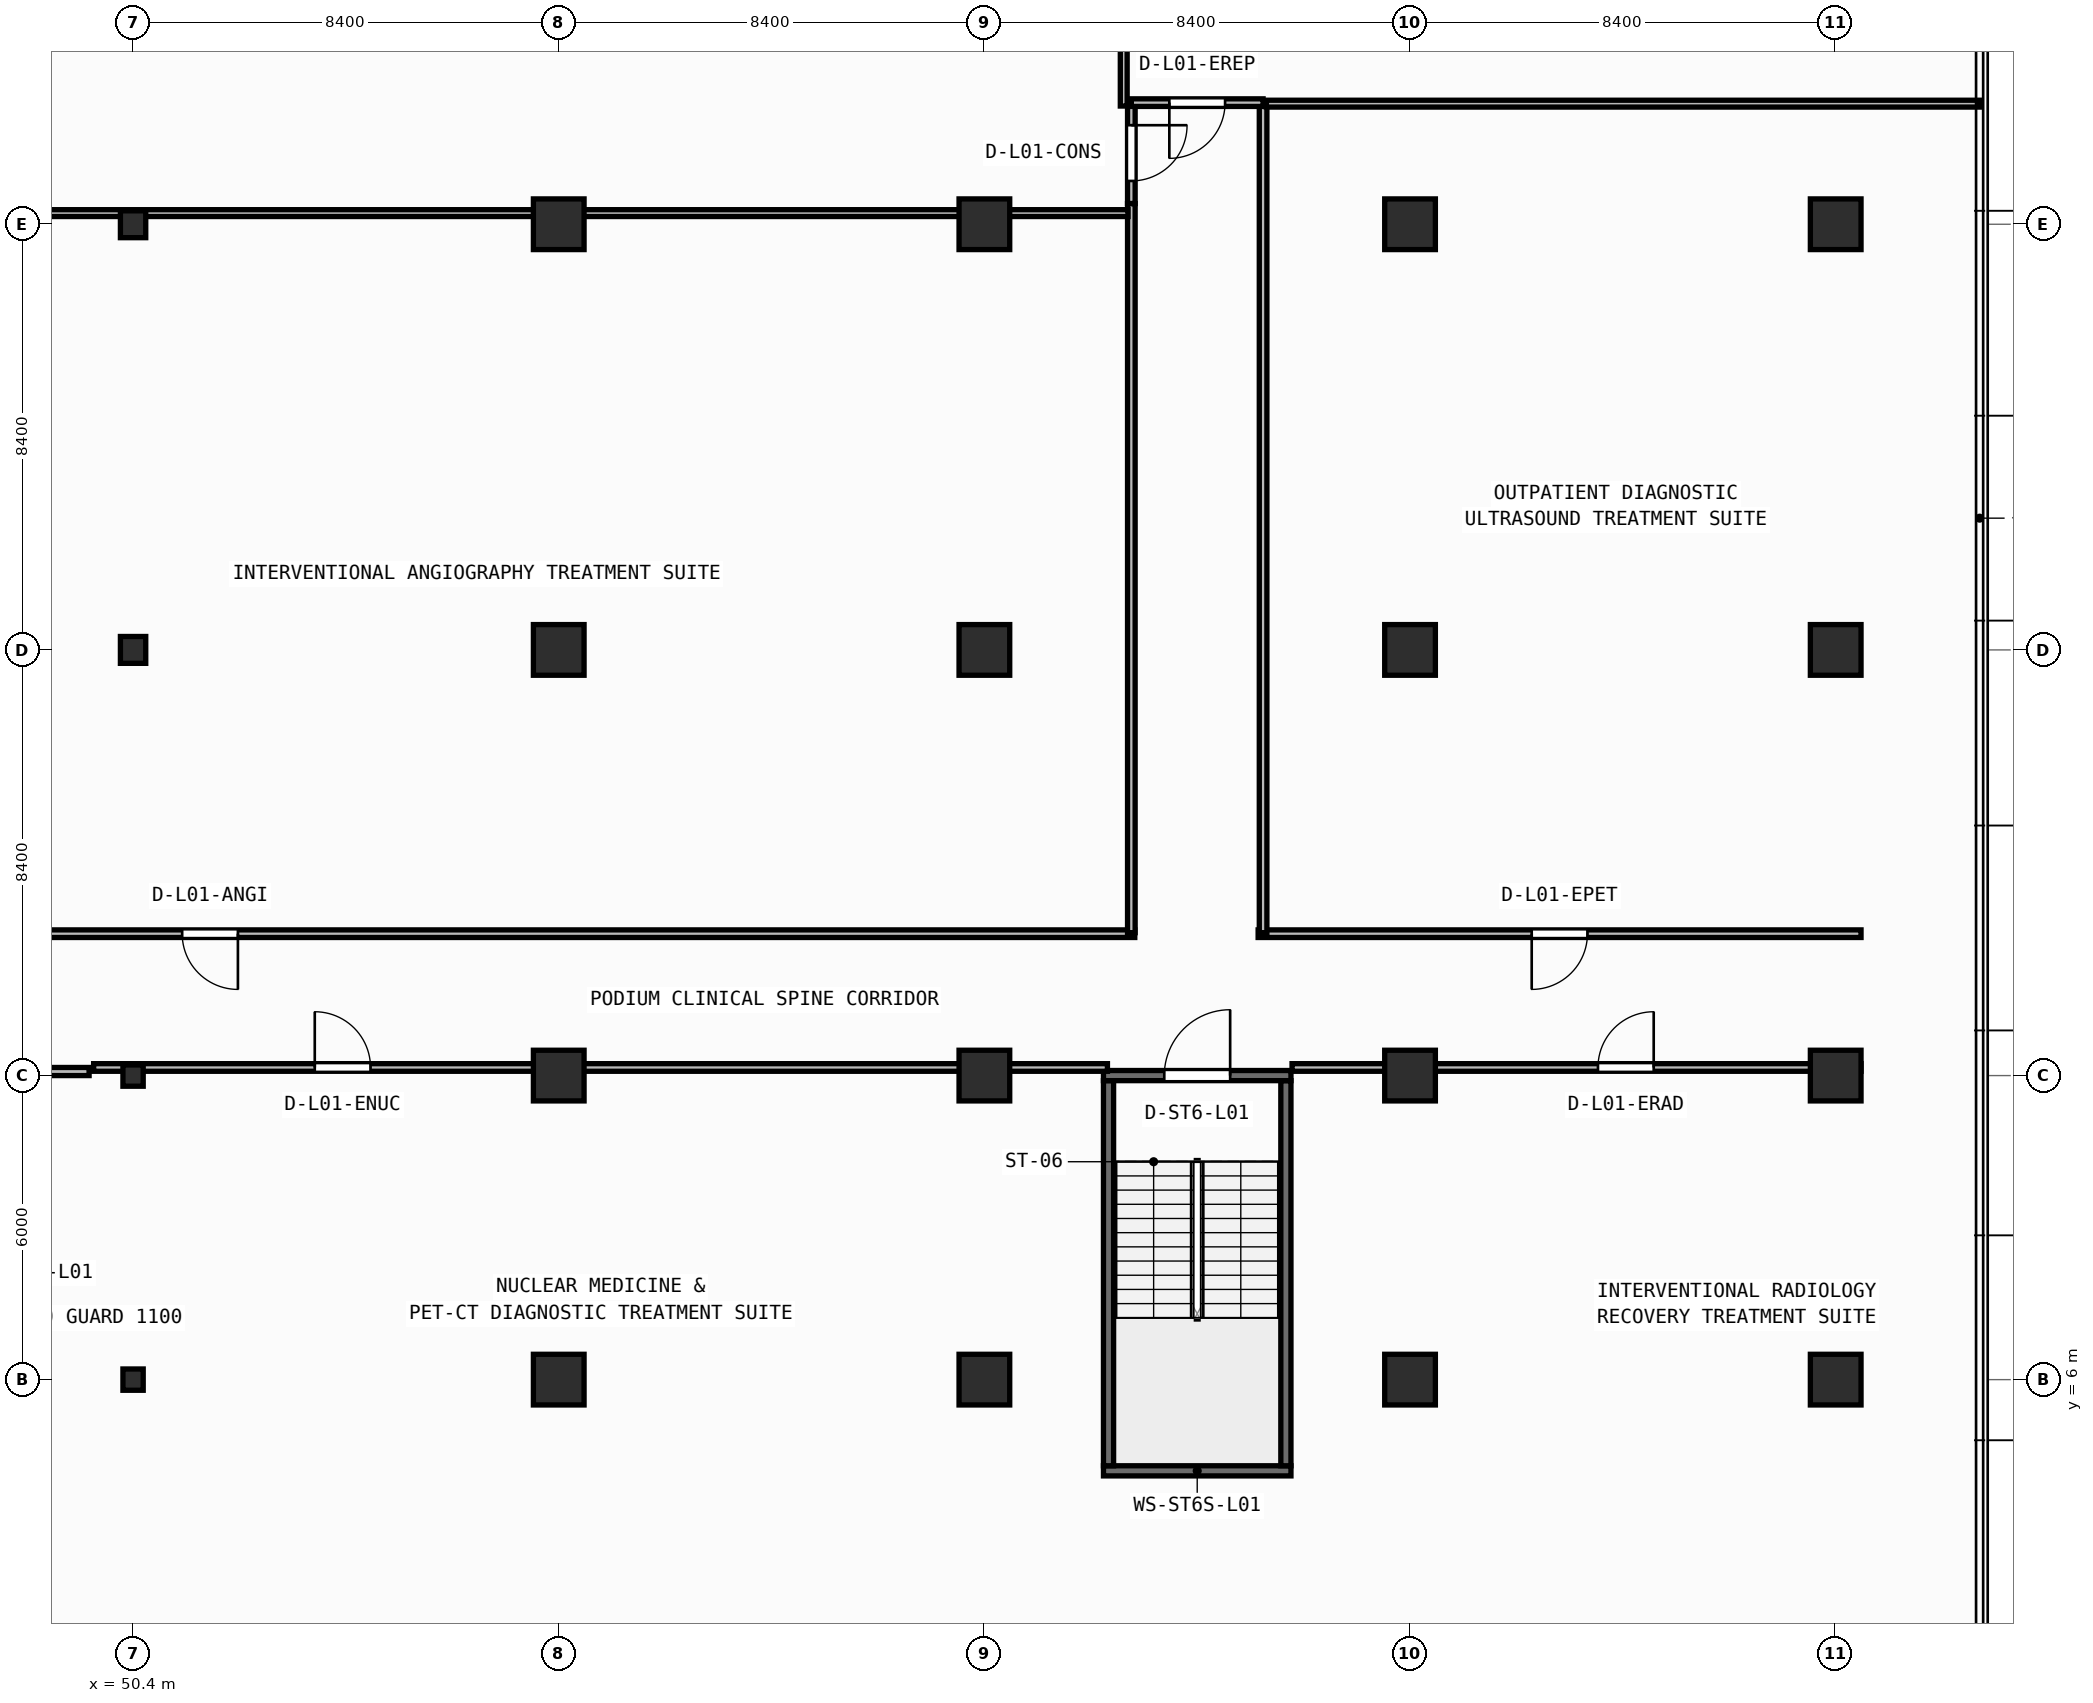
"""IFC4 building model, lengths in metres.
Left out: names, types, materials, properties, quantities, classifications, styles, units other than length and angle.
Written with IfcOpenShell. Run it as: python <this file> out.ifc"""

import sys

from ifc_helpers import new_model, si_unit, direction, frame, frame_2d, origin, origin_2d, place, context, subcontext, project, spatial, rectangle, circle, i_section, extrude, element, fill, save


model = new_model("IFC4")
c1 = context("Model", 3, precision=1e-05, world=origin(), true_north=direction((0.0, 1.0)))
c2 = subcontext(c1, "Body", "Model", "MODEL_VIEW")
j1 = project(units=[si_unit("LENGTHUNIT", "METRE"), si_unit("PLANEANGLEUNIT", "RADIAN")], contexts=[c1])
p1 = place(None, origin())
s1 = spatial("IfcSite", under=j1, at=p1, CompositionType="ELEMENT")
p2 = place(p1, origin())
s2 = spatial("IfcBuilding", under=s1, at=p2, CompositionType="ELEMENT")
p3 = place(p2, frame((0.0, 0.0, 4.5)))
s3 = spatial("IfcBuildingStorey", under=s2, at=p3, CompositionType="ELEMENT", Elevation=4.5)
p4 = place(p3, frame((50.4, 6.0, 0.0), z_axis=(0.0, 0.0, 1.0), x_axis=(1.0, 0.0, 0.0)))
e1 = element("IfcColumn", 1, at=p4, inside=s3, PredefinedType="COLUMN", context=c2, shape_type="SweptSolid", body=[
    extrude(i_section(OverallWidth=0.4, OverallDepth=0.42, WebThickness=0.025, FlangeThickness=0.04, at=origin_2d()), origin(), (0.0, 0.0, 1.0), 4.5),
])
for number, where, z_axis, x_axis in (
    (2, (58.8, 6.0, 0.0), (0.0, 0.0, 1.0), (1.0, 0.0, 0.0)),
    (3, (67.2, 6.0, 0.0), (0.0, 0.0, 1.0), (1.0, 0.0, 0.0)),
    (4, (75.6, 6.0, 0.0), (0.0, 0.0, 1.0), (1.0, 0.0, 0.0)),
    (5, (84.0, 6.0, 0.0), (0.0, 0.0, 1.0), (1.0, 0.0, 0.0)),
):
    element("IfcColumn", number, at=place(p3, frame(where, z_axis=z_axis, x_axis=x_axis)), inside=s3, PredefinedType="COLUMN", context=c2, shape_type="SweptSolid", body=[
        extrude(circle(Radius=0.5, at=origin_2d()), origin(), (0.0, 0.0, 1.0), 4.5),
    ])
p5 = place(p3, frame((50.4, 12.0, 0.0), z_axis=(0.0, 0.0, 1.0), x_axis=(1.0, 0.0, 0.0)))
e6 = element("IfcColumn", 6, at=p5, inside=s3, PredefinedType="COLUMN", context=c2, shape_type="SweptSolid", body=[
    extrude(i_section(OverallWidth=0.4, OverallDepth=0.42, WebThickness=0.025, FlangeThickness=0.04, at=origin_2d()), origin(), (0.0, 0.0, 1.0), 4.5),
])
for number, where, z_axis, x_axis in (
    (7, (58.8, 12.0, 0.0), (0.0, 0.0, 1.0), (1.0, 0.0, 0.0)),
    (8, (67.2, 12.0, 0.0), (0.0, 0.0, 1.0), (1.0, 0.0, 0.0)),
    (9, (75.6, 12.0, 0.0), (0.0, 0.0, 1.0), (1.0, 0.0, 0.0)),
    (10, (84.0, 12.0, 0.0), (0.0, 0.0, 1.0), (1.0, 0.0, 0.0)),
):
    element("IfcColumn", number, at=place(p3, frame(where, z_axis=z_axis, x_axis=x_axis)), inside=s3, PredefinedType="COLUMN", context=c2, shape_type="SweptSolid", body=[
        extrude(circle(Radius=0.5, at=origin_2d()), origin(), (0.0, 0.0, 1.0), 4.5),
    ])
p6 = place(p3, frame((50.4, 20.4, 0.0), z_axis=(0.0, 0.0, 1.0), x_axis=(1.0, 0.0, 0.0)))
e11 = element("IfcColumn", 11, at=p6, inside=s3, PredefinedType="COLUMN", context=c2, shape_type="SweptSolid", body=[
    extrude(i_section(OverallWidth=0.5, OverallDepth=0.53, WebThickness=0.028, FlangeThickness=0.045, at=origin_2d()), origin(), (0.0, 0.0, 1.0), 4.5),
])
for number, where, z_axis, x_axis in (
    (12, (58.8, 20.4, 0.0), (0.0, 0.0, 1.0), (1.0, 0.0, 0.0)),
    (13, (67.2, 20.4, 0.0), (0.0, 0.0, 1.0), (1.0, 0.0, 0.0)),
    (14, (75.6, 20.4, 0.0), (0.0, 0.0, 1.0), (1.0, 0.0, 0.0)),
    (15, (84.0, 20.4, 0.0), (0.0, 0.0, 1.0), (1.0, 0.0, 0.0)),
):
    element("IfcColumn", number, at=place(p3, frame(where, z_axis=z_axis, x_axis=x_axis)), inside=s3, PredefinedType="COLUMN", context=c2, shape_type="SweptSolid", body=[
        extrude(circle(Radius=0.5, at=origin_2d()), origin(), (0.0, 0.0, 1.0), 4.5),
    ])
p7 = place(p3, frame((50.4, 28.8, 0.0), z_axis=(0.0, 0.0, 1.0), x_axis=(1.0, 0.0, 0.0)))
e16 = element("IfcColumn", 16, at=p7, inside=s3, PredefinedType="COLUMN", context=c2, shape_type="SweptSolid", body=[
    extrude(i_section(OverallWidth=0.5, OverallDepth=0.53, WebThickness=0.028, FlangeThickness=0.045, at=origin_2d()), origin(), (0.0, 0.0, 1.0), 4.5),
])
for number, where, z_axis, x_axis in (
    (17, (58.8, 28.8, 0.0), (0.0, 0.0, 1.0), (1.0, 0.0, 0.0)),
    (18, (67.2, 28.8, 0.0), (0.0, 0.0, 1.0), (1.0, 0.0, 0.0)),
    (19, (75.6, 28.8, 0.0), (0.0, 0.0, 1.0), (1.0, 0.0, 0.0)),
    (20, (84.0, 28.8, 0.0), (0.0, 0.0, 1.0), (1.0, 0.0, 0.0)),
):
    element("IfcColumn", number, at=place(p3, frame(where, z_axis=z_axis, x_axis=x_axis)), inside=s3, PredefinedType="COLUMN", context=c2, shape_type="SweptSolid", body=[
        extrude(circle(Radius=0.5, at=origin_2d()), origin(), (0.0, 0.0, 1.0), 4.5),
    ])
p8 = place(p3, frame((69.55, 4.2, 0.0), z_axis=(0.0, 0.0, 1.0), x_axis=(1.0, 0.0, 0.0)))
e21 = element("IfcWall", 21, at=p8, inside=s3, PredefinedType="SHEAR", context=c2, shape_type="SweptSolid", body=[
    extrude(rectangle(XDim=3.7, YDim=0.2, at=frame_2d((1.85, 0.0))), origin(), (0.0, 0.0, 1.0), 4.25),
])
for number, where, z_axis, x_axis in (
    (22, (69.65, 4.3, 0.0), (0.0, 0.0, 1.0), (0.0, 1.0, 0.0)),
    (23, (73.15, 4.3, 0.0), (0.0, 0.0, 1.0), (0.0, 1.0, 0.0)),
):
    element("IfcWall", number, at=place(p3, frame(where, z_axis=z_axis, x_axis=x_axis)), inside=s3, PredefinedType="SHEAR", context=c2, shape_type="SweptSolid", body=[
        extrude(rectangle(XDim=7.6, YDim=0.2, at=frame_2d((3.8, 0.0))), origin(), (0.0, 0.0, 1.0), 4.25),
    ])
p9 = place(p3, frame((69.55, 12.0, 0.0), z_axis=(0.0, 0.0, 1.0), x_axis=(1.0, 0.0, 0.0)))
e24 = element("IfcWall", 24, at=p9, inside=s3, PredefinedType="SHEAR", context=c2, shape_type="SweptSolid", body=[
    extrude(rectangle(XDim=3.7, YDim=0.2, at=frame_2d((1.85, 0.0))), origin(), (0.0, 0.0, 1.0), 4.25),
])
p10 = place(p9, frame((1.2, 0.0, 0.0)))
e25 = element("IfcOpeningElement", 25, at=p10, cuts=e24, PredefinedType="OPENING", context=c2, shape_type="SweptSolid", body=[
    extrude(rectangle(XDim=1.3, YDim=2.15, at=frame_2d((0.65, 1.075))), frame((0.0, 0.11, 0.0), z_axis=(0.0, -1.0, 0.0), x_axis=(1.0, 0.0, 0.0)), (0.0, 0.0, 1.0), 0.22),
])
p11 = place(p3, frame((49.622, 12.16, 0.0), z_axis=(0.0, 0.0, 1.0), x_axis=(1.0, 0.0, 0.0)))
e26 = element("IfcWall", 26, at=p11, inside=s3, PredefinedType="PARTITIONING", context=c2, shape_type="SweptSolid", body=[
    extrude(rectangle(XDim=20.007, YDim=0.15, at=frame_2d((10.003, 0.0))), origin(), (0.0, 0.0, 1.0), 3.425),
])
p12 = place(p11, frame((4.364, 0.0, 0.0)))
e27 = element("IfcOpeningElement", 27, at=p12, cuts=e26, PredefinedType="OPENING", context=c2, shape_type="SweptSolid", body=[
    extrude(rectangle(XDim=1.1, YDim=2.1, at=frame_2d((0.55, 1.05))), frame((0.0, 0.085, 0.0), z_axis=(0.0, -1.0, 0.0), x_axis=(1.0, 0.0, 0.0)), (0.0, 0.0, 1.0), 0.17),
])
p13 = place(p3, frame((73.271, 12.16, 0.0), z_axis=(0.0, 0.0, 1.0), x_axis=(1.0, 0.0, 0.0)))
e28 = element("IfcWall", 28, at=p13, inside=s3, PredefinedType="PARTITIONING", context=c2, shape_type="SweptSolid", body=[
    extrude(rectangle(XDim=11.229, YDim=0.15, at=frame_2d((5.614, 0.0))), origin(), (0.0, 0.0, 1.0), 3.425),
])
p14 = place(p13, frame((6.037, 0.0, 0.0)))
e29 = element("IfcOpeningElement", 29, at=p14, cuts=e28, PredefinedType="OPENING", context=c2, shape_type="SweptSolid", body=[
    extrude(rectangle(XDim=1.1, YDim=2.1, at=frame_2d((0.55, 1.05))), frame((0.0, 0.085, 0.0), z_axis=(0.0, -1.0, 0.0), x_axis=(1.0, 0.0, 0.0)), (0.0, 0.0, 1.0), 0.17),
])
p15 = place(p3, frame((70.168, 14.8, 0.0), z_axis=(0.0, 0.0, 1.0), x_axis=(-1.0, 0.0, 0.0)))
e30 = element("IfcWall", 30, at=p15, inside=s3, PredefinedType="PARTITIONING", context=c2, shape_type="SweptSolid", body=[
    extrude(rectangle(XDim=36.498, YDim=0.15, at=frame_2d((18.249, 0.0))), origin(), (0.0, 0.0, 1.0), 4.25),
])
p16 = place(p15, frame((17.699, 0.0, 0.0)))
e31 = element("IfcOpeningElement", 31, at=p16, cuts=e30, PredefinedType="OPENING", context=c2, shape_type="SweptSolid", body=[
    extrude(rectangle(XDim=1.1, YDim=2.1, at=frame_2d((0.55, 1.05))), frame((0.0, 0.085, 0.0), z_axis=(0.0, -1.0, 0.0), x_axis=(1.0, 0.0, 0.0)), (0.0, 0.0, 1.0), 0.17),
])
p17 = place(p3, frame((84.5, 14.8, 0.0), z_axis=(0.0, 0.0, 1.0), x_axis=(-1.0, 0.0, 0.0)))
e32 = element("IfcWall", 32, at=p17, inside=s3, PredefinedType="PARTITIONING", context=c2, shape_type="SweptSolid", body=[
    extrude(rectangle(XDim=11.898, YDim=0.15, at=frame_2d((5.949, 0.0))), origin(), (0.0, 0.0, 1.0), 4.25),
])
p18 = place(p17, frame((5.399, 0.0, 0.0)))
e33 = element("IfcOpeningElement", 33, at=p18, cuts=e32, PredefinedType="OPENING", context=c2, shape_type="SweptSolid", body=[
    extrude(rectangle(XDim=1.1, YDim=2.1, at=frame_2d((0.55, 1.05))), frame((0.0, 0.085, 0.0), z_axis=(0.0, -1.0, 0.0), x_axis=(1.0, 0.0, 0.0)), (0.0, 0.0, 1.0), 0.17),
])
p19 = place(p3, frame((70.1, 29.207, 0.0), z_axis=(0.0, 0.0, 1.0), x_axis=(0.0, -1.0, 0.0)))
e34 = element("IfcWall", 34, at=p19, inside=s3, PredefinedType="PARTITIONING", context=c2, shape_type="SweptSolid", body=[
    extrude(rectangle(XDim=14.387, YDim=0.15, at=frame_2d((7.194, 0.0))), origin(), (0.0, 0.0, 1.0), 4.25),
])
p20 = place(p3, frame((72.7, 14.82, 0.0), z_axis=(0.0, 0.0, 1.0), x_axis=(0.0, 1.0, 0.0)))
e35 = element("IfcWall", 35, at=p20, inside=s3, PredefinedType="PARTITIONING", context=c2, shape_type="SweptSolid", body=[
    extrude(rectangle(XDim=16.38, YDim=0.15, at=frame_2d((8.19, 0.0))), origin(), (0.0, 0.0, 1.0), 4.25),
])
p21 = place(p3, frame((70.1, 31.2, 0.0), z_axis=(0.0, 0.0, 1.0), x_axis=(0.0, -1.0, 0.0)))
e36 = element("IfcWall", 36, at=p21, inside=s3, PredefinedType="PARTITIONING", context=c2, shape_type="SweptSolid", body=[
    extrude(rectangle(XDim=1.991, YDim=0.15, at=frame_2d((0.995, 0.0))), origin(), (0.0, 0.0, 1.0), 4.25),
])
p22 = place(p21, frame((0.445, 0.0, 0.0)))
e37 = element("IfcOpeningElement", 37, at=p22, cuts=e36, PredefinedType="OPENING", context=c2, shape_type="SweptSolid", body=[
    extrude(rectangle(XDim=1.1, YDim=2.1, at=frame_2d((0.55, 1.05))), frame((0.0, 0.085, 0.0), z_axis=(0.0, -1.0, 0.0), x_axis=(1.0, 0.0, 0.0)), (0.0, 0.0, 1.0), 0.17),
])
p23 = place(p3, frame((72.7, 31.2, 0.0), z_axis=(0.0, 0.0, 1.0), x_axis=(-1.0, 0.0, 0.0)))
e38 = element("IfcWall", 38, at=p23, inside=s3, PredefinedType="PARTITIONING", context=c2, shape_type="SweptSolid", body=[
    extrude(rectangle(XDim=2.6, YDim=0.15, at=frame_2d((1.3, 0.0))), origin(), (0.0, 0.0, 1.0), 4.25),
])
p24 = place(p23, frame((0.75, 0.0, 0.0)))
e39 = element("IfcOpeningElement", 39, at=p24, cuts=e38, PredefinedType="OPENING", context=c2, shape_type="SweptSolid", body=[
    extrude(rectangle(XDim=1.1, YDim=2.1, at=frame_2d((0.55, 1.05))), frame((0.0, 0.085, 0.0), z_axis=(0.0, -1.0, 0.0), x_axis=(1.0, 0.0, 0.0)), (0.0, 0.0, 1.0), 0.17),
])
p25 = place(p3, frame((70.035, 29.02, 0.0), z_axis=(0.0, 0.0, 1.0), x_axis=(-1.0, 0.0, 0.0)))
e40 = element("IfcWall", 40, at=p25, inside=s3, PredefinedType="PARTITIONING", context=c2, shape_type="SweptSolid", body=[
    extrude(rectangle(XDim=30.492, YDim=0.135, at=frame_2d((15.246, 0.0))), origin(), (0.0, 0.0, 1.0), 3.425),
])
p26 = place(p3, frame((86.84, 31.18, 0.0), z_axis=(0.0, 0.0, 1.0), x_axis=(-1.0, 0.0, 0.0)))
e41 = element("IfcWall", 41, at=p26, inside=s3, PredefinedType="PARTITIONING", context=c2, shape_type="SweptSolid", body=[
    extrude(rectangle(XDim=14.075, YDim=0.135, at=frame_2d((7.038, 0.0))), origin(), (0.0, 0.0, 1.0), 4.25),
])
p27 = place(p3, frame((69.95, 31.133, 0.0), z_axis=(0.0, 0.0, 1.0), x_axis=(0.0, 1.0, 0.0)))
e42 = element("IfcWall", 42, at=p27, inside=s3, PredefinedType="PARTITIONING", context=c2, shape_type="SweptSolid", body=[
    extrude(rectangle(XDim=15.507, YDim=0.135, at=frame_2d((7.753, 0.0))), origin(), (0.0, 0.0, 1.0), 4.25),
])
p28 = place(p3, frame((46.689, 12.08, 0.0), z_axis=(0.0, 0.0, 1.0), x_axis=(1.0, 0.0, 0.0)))
e43 = element("IfcWall", 43, at=p28, inside=s3, PredefinedType="PARTITIONING", context=c2, shape_type="SweptSolid", body=[
    extrude(rectangle(XDim=2.843, YDim=0.16, at=frame_2d((1.421, 0.0))), origin(), (0.0, 0.0, 1.0), 3.425),
])
p29 = place(p10, origin())
e44 = element("IfcDoor", 44, at=p29, inside=s3, OperationType="SINGLE_SWING_RIGHT", PredefinedType="DOOR", context=c2, shape_type="SweptSolid", body=[
    extrude(rectangle(XDim=1.3, YDim=2.15, at=frame_2d((0.65, 1.075))), frame((0.0, 0.025, 0.0), z_axis=(0.0, -1.0, 0.0), x_axis=(1.0, 0.0, 0.0)), (0.0, 0.0, 1.0), 0.05),
])
fill(e25, e44)
p30 = place(p12, origin())
e45 = element("IfcDoor", 45, at=p30, inside=s3, OperationType="SINGLE_SWING_LEFT", PredefinedType="DOOR", context=c2, shape_type="SweptSolid", body=[
    extrude(rectangle(XDim=1.1, YDim=2.1, at=frame_2d((0.55, 1.05))), frame((0.0, 0.025, 0.0), z_axis=(0.0, -1.0, 0.0), x_axis=(1.0, 0.0, 0.0)), (0.0, 0.0, 1.0), 0.05),
])
fill(e27, e45)
p31 = place(p14, origin())
e46 = element("IfcDoor", 46, at=p31, inside=s3, OperationType="SINGLE_SWING_RIGHT", PredefinedType="DOOR", context=c2, shape_type="SweptSolid", body=[
    extrude(rectangle(XDim=1.1, YDim=2.1, at=frame_2d((0.55, 1.05))), frame((0.0, 0.025, 0.0), z_axis=(0.0, -1.0, 0.0), x_axis=(1.0, 0.0, 0.0)), (0.0, 0.0, 1.0), 0.05),
])
fill(e29, e46)
p32 = place(p16, origin())
e47 = element("IfcDoor", 47, at=p32, inside=s3, OperationType="SINGLE_SWING_LEFT", PredefinedType="DOOR", context=c2, shape_type="SweptSolid", body=[
    extrude(rectangle(XDim=1.1, YDim=2.1, at=frame_2d((0.55, 1.05))), frame((0.0, 0.025, 0.0), z_axis=(0.0, -1.0, 0.0), x_axis=(1.0, 0.0, 0.0)), (0.0, 0.0, 1.0), 0.05),
])
fill(e31, e47)
p33 = place(p18, origin())
e48 = element("IfcDoor", 48, at=p33, inside=s3, OperationType="SINGLE_SWING_RIGHT", PredefinedType="DOOR", context=c2, shape_type="SweptSolid", body=[
    extrude(rectangle(XDim=1.1, YDim=2.1, at=frame_2d((0.55, 1.05))), frame((0.0, 0.025, 0.0), z_axis=(0.0, -1.0, 0.0), x_axis=(1.0, 0.0, 0.0)), (0.0, 0.0, 1.0), 0.05),
])
fill(e33, e48)
p34 = place(p22, origin())
e49 = element("IfcDoor", 49, at=p34, inside=s3, OperationType="SINGLE_SWING_LEFT", PredefinedType="DOOR", context=c2, shape_type="SweptSolid", body=[
    extrude(rectangle(XDim=1.1, YDim=2.1, at=frame_2d((0.55, 1.05))), frame((0.0, 0.025, 0.0), z_axis=(0.0, -1.0, 0.0), x_axis=(1.0, 0.0, 0.0)), (0.0, 0.0, 1.0), 0.05),
])
fill(e37, e49)
p35 = place(p24, origin())
e50 = element("IfcDoor", 50, at=p35, inside=s3, OperationType="SINGLE_SWING_RIGHT", PredefinedType="DOOR", context=c2, shape_type="SweptSolid", body=[
    extrude(rectangle(XDim=1.1, YDim=2.1, at=frame_2d((0.55, 1.05))), frame((0.0, 0.025, 0.0), z_axis=(0.0, -1.0, 0.0), x_axis=(1.0, 0.0, 0.0)), (0.0, 0.0, 1.0), 0.05),
])
fill(e39, e50)
save(model, sys.argv[1])
